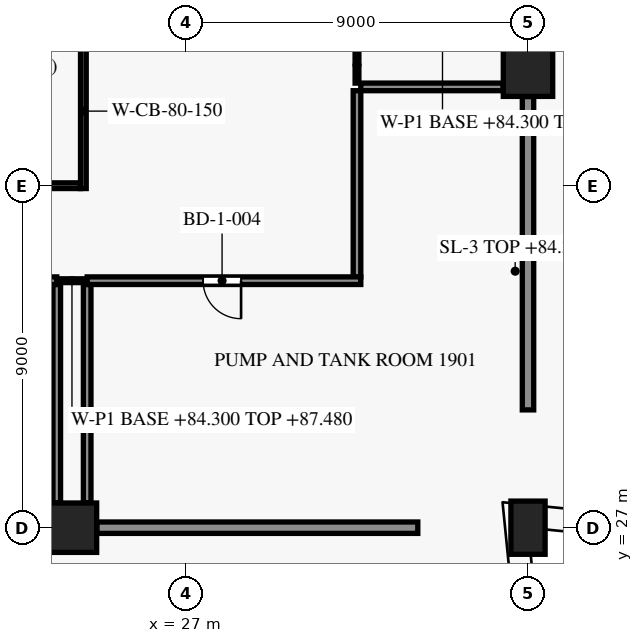
"""IFC4 building model, lengths in metres.
Left out: names, types, materials, properties, quantities, classifications, styles, units other than length and angle.
Written with IfcOpenShell. Run it as: python <this file> out.ifc"""

import sys

from ifc_helpers import new_model, si_unit, direction, frame, frame_2d, origin, origin_2d, place, context, subcontext, project, spatial, rectangle, extrude, element, fill, save


model = new_model("IFC4")
c1 = context("Model", 3, precision=1e-05, world=origin(), true_north=direction((0.0, 1.0)))
c2 = subcontext(c1, "Body", "Model", "MODEL_VIEW")
j1 = project(units=[si_unit("LENGTHUNIT", "METRE"), si_unit("PLANEANGLEUNIT", "RADIAN")], contexts=[c1])
p1 = place(None, origin())
s1 = spatial("IfcSite", under=j1, at=p1, CompositionType="ELEMENT")
p2 = place(p1, origin())
s2 = spatial("IfcBuilding", under=s1, at=p2, CompositionType="ELEMENT")
p3 = place(p2, frame((0.0, 0.0, 84.3)))
s3 = spatial("IfcBuildingStorey", under=s2, at=p3, CompositionType="ELEMENT", Elevation=84.3)
p4 = place(p3, frame((36.0, 27.0, 0.0), z_axis=(0.0, 0.0, 1.0), x_axis=(-0.0995038382, 0.995037178292, 0.0)))
e1 = element("IfcColumn", 1, at=p4, inside=s3, PredefinedType="COLUMN", context=c2, shape_type="SweptSolid", body=[
    extrude(rectangle(XDim=0.9, YDim=1.4, at=origin_2d()), origin(), (0.0, 0.0, 1.0), 4.2),
])
for number, where, z_axis, x_axis in (
    (2, (24.0, 27.0, 0.0), (0.0, 0.0, 1.0), (1.0, 0.0, 0.0)),
    (3, (36.0, 39.0, 0.0), (0.0, 0.0, 1.0), (1.0, 0.0, 0.0)),
):
    element("IfcColumn", number, at=place(p3, frame(where, z_axis=z_axis, x_axis=x_axis)), inside=s3, PredefinedType="COLUMN", context=c2, shape_type="SweptSolid", body=[
        extrude(rectangle(XDim=1.3, YDim=1.3, at=origin_2d()), origin(), (0.0, 0.0, 1.0), 4.2),
    ])
p5 = place(p3, frame((12.4, 36.0, 0.0), z_axis=(0.0, 0.0, 1.0), x_axis=(1.0, 0.0, 0.0)))
e4 = element("IfcWall", 4, at=p5, inside=s3, PredefinedType="SHEAR", context=c2, shape_type="SweptSolid", body=[
    extrude(rectangle(XDim=11.825, YDim=0.15, at=frame_2d((5.913, 0.0))), origin(), (0.0, 0.0, 1.0), 3.9),
])
p6 = place(p5, frame((1.05, 0.0, 0.0)))
e5 = element("IfcOpeningElement", 5, at=p6, cuts=e4, PredefinedType="OPENING", context=c2, shape_type="SweptSolid", body=[
    extrude(rectangle(XDim=0.9, YDim=2.1, at=frame_2d((0.45, 1.05))), frame((0.0, 0.085, 0.0), z_axis=(0.0, -1.0, 0.0), x_axis=(1.0, 0.0, 0.0)), (0.0, 0.0, 1.0), 0.17),
])
p7 = place(p5, frame((4.275, 0.0, 0.0)))
e6 = element("IfcOpeningElement", 6, at=p7, cuts=e4, PredefinedType="OPENING", context=c2, shape_type="SweptSolid", body=[
    extrude(rectangle(XDim=0.95, YDim=2.1, at=frame_2d((0.475, 1.05))), frame((0.0, 0.085, 0.0), z_axis=(0.0, -1.0, 0.0), x_axis=(1.0, 0.0, 0.0)), (0.0, 0.0, 1.0), 0.17),
])
p8 = place(p5, frame((8.75, 0.0, 0.0)))
e7 = element("IfcOpeningElement", 7, at=p8, cuts=e4, PredefinedType="OPENING", context=c2, shape_type="SweptSolid", body=[
    extrude(rectangle(XDim=0.9, YDim=2.1, at=frame_2d((0.45, 1.05))), frame((0.0, 0.085, 0.0), z_axis=(0.0, -1.0, 0.0), x_axis=(1.0, 0.0, 0.0)), (0.0, 0.0, 1.0), 0.17),
])
p9 = place(p3, frame((24.3, 35.925, 0.0), z_axis=(0.0, 0.0, 1.0), x_axis=(0.0, 1.0, 0.0)))
e8 = element("IfcWall", 8, at=p9, inside=s3, PredefinedType="SHEAR", context=c2, shape_type="SweptSolid", body=[
    extrude(rectangle(XDim=4.075, YDim=0.15, at=frame_2d((2.038, 0.0))), origin(), (0.0, 0.0, 1.0), 3.9),
])
p10 = place(p3, frame((33.1, 27.0, 0.0), z_axis=(0.0, 0.0, 1.0), x_axis=(-1.0, 0.0, 0.0)))
e9 = element("IfcWall", 9, at=p10, inside=s3, PredefinedType="PARTITIONING", context=c2, shape_type="SweptSolid", body=[
    extrude(rectangle(XDim=8.445, YDim=0.3, at=frame_2d((4.223, 0.0))), origin(), (0.0, 0.0, 1.0), 3.18),
])
for number, where, z_axis, x_axis in (
    (10, (24.4, 27.655, 0.0), (0.0, 0.0, 1.0), (0.0, 1.0, 0.0)),
    (11, (23.6, 33.4, 0.0), (0.0, 0.0, 1.0), (0.0, -1.0, 0.0)),
):
    element("IfcWall", number, at=place(p3, frame(where, z_axis=z_axis, x_axis=x_axis)), inside=s3, PredefinedType="PARTITIONING", context=c2, shape_type="SweptSolid", body=[
        extrude(rectangle(XDim=5.745, YDim=0.2, at=frame_2d((2.873, 0.0))), origin(), (0.0, 0.0, 1.0), 3.88),
    ])
p11 = place(p3, frame((23.6, 33.5, 0.0), z_axis=(0.0, 0.0, 1.0), x_axis=(-1.0, 0.0, 0.0)))
e12 = element("IfcWall", 12, at=p11, inside=s3, PredefinedType="PARTITIONING", context=c2, shape_type="SweptSolid", body=[
    extrude(rectangle(XDim=3.3, YDim=0.2, at=frame_2d((1.65, 0.0))), origin(), (0.0, 0.0, 1.0), 3.88),
])
p12 = place(p3, frame((24.4, 33.5, 0.0), z_axis=(0.0, 0.0, 1.0), x_axis=(-1.0, 0.0, 0.0)))
e13 = element("IfcWall", 13, at=p12, inside=s3, PredefinedType="PARTITIONING", context=c2, shape_type="SweptSolid", body=[
    extrude(rectangle(XDim=0.8, YDim=0.1, at=frame_2d((0.4, 0.0))), origin(), (0.0, 0.0, 1.0), 3.18),
])
p13 = place(p3, frame((31.6, 33.5, 0.0), z_axis=(0.0, 0.0, 1.0), x_axis=(-1.0, 0.0, 0.0)))
e14 = element("IfcWall", 14, at=p13, inside=s3, PredefinedType="PARTITIONING", context=c2, shape_type="SweptSolid", body=[
    extrude(rectangle(XDim=7.2, YDim=0.2, at=frame_2d((3.6, 0.0))), origin(), (0.0, 0.0, 1.0), 3.88),
])
p14 = place(p13, frame((3.15, 0.0, 0.0)))
e15 = element("IfcOpeningElement", 15, at=p14, cuts=e14, PredefinedType="OPENING", context=c2, shape_type="SweptSolid", body=[
    extrude(rectangle(XDim=1.0, YDim=2.1, at=frame_2d((0.5, 1.05))), frame((0.0, 0.11, 0.0), z_axis=(0.0, -1.0, 0.0), x_axis=(1.0, 0.0, 0.0)), (0.0, 0.0, 1.0), 0.22),
])
p15 = place(p3, frame((36.0, 38.345, 0.0), z_axis=(0.0, 0.0, 1.0), x_axis=(0.0, -1.0, 0.0)))
e16 = element("IfcWall", 16, at=p15, inside=s3, PredefinedType="PARTITIONING", context=c2, shape_type="SweptSolid", body=[
    extrude(rectangle(XDim=8.245, YDim=0.3, at=frame_2d((4.123, 0.0))), origin(), (0.0, 0.0, 1.0), 3.18),
])
p16 = place(p3, frame((31.5, 38.5, 0.0), z_axis=(0.0, 0.0, 1.0), x_axis=(0.0, -1.0, 0.0)))
e17 = element("IfcWall", 17, at=p16, inside=s3, PredefinedType="PARTITIONING", context=c2, shape_type="SweptSolid", body=[
    extrude(rectangle(XDim=4.9, YDim=0.2, at=frame_2d((2.45, 0.0))), origin(), (0.0, 0.0, 1.0), 3.88),
])
p17 = place(p3, frame((31.6, 38.6, 0.0), z_axis=(0.0, 0.0, 1.0), x_axis=(1.0, 0.0, 0.0)))
e18 = element("IfcWall", 18, at=p17, inside=s3, PredefinedType="PARTITIONING", context=c2, shape_type="SweptSolid", body=[
    extrude(rectangle(XDim=3.745, YDim=0.2, at=frame_2d((1.873, 0.0))), origin(), (0.0, 0.0, 1.0), 3.88),
])
p18 = place(p3, frame((31.5, 39.65, 0.0), z_axis=(0.0, 0.0, 1.0), x_axis=(0.0, -1.0, 0.0)))
e19 = element("IfcWall", 19, at=p18, inside=s3, PredefinedType="PARTITIONING", context=c2, shape_type="SweptSolid", body=[
    extrude(rectangle(XDim=0.95, YDim=0.1, at=frame_2d((0.475, 0.0))), origin(), (0.0, 0.0, 1.0), 3.88),
])
p19 = place(p14, origin())
e20 = element("IfcDoor", 20, at=p19, inside=s3, OperationType="SINGLE_SWING_RIGHT", PredefinedType="DOOR", context=c2, shape_type="SweptSolid", body=[
    extrude(rectangle(XDim=1.0, YDim=2.1, at=frame_2d((0.5, 1.05))), frame((0.0, 0.025, 0.0), z_axis=(0.0, -1.0, 0.0), x_axis=(1.0, 0.0, 0.0)), (0.0, 0.0, 1.0), 0.05),
])
fill(e15, e20)
save(model, sys.argv[1])
